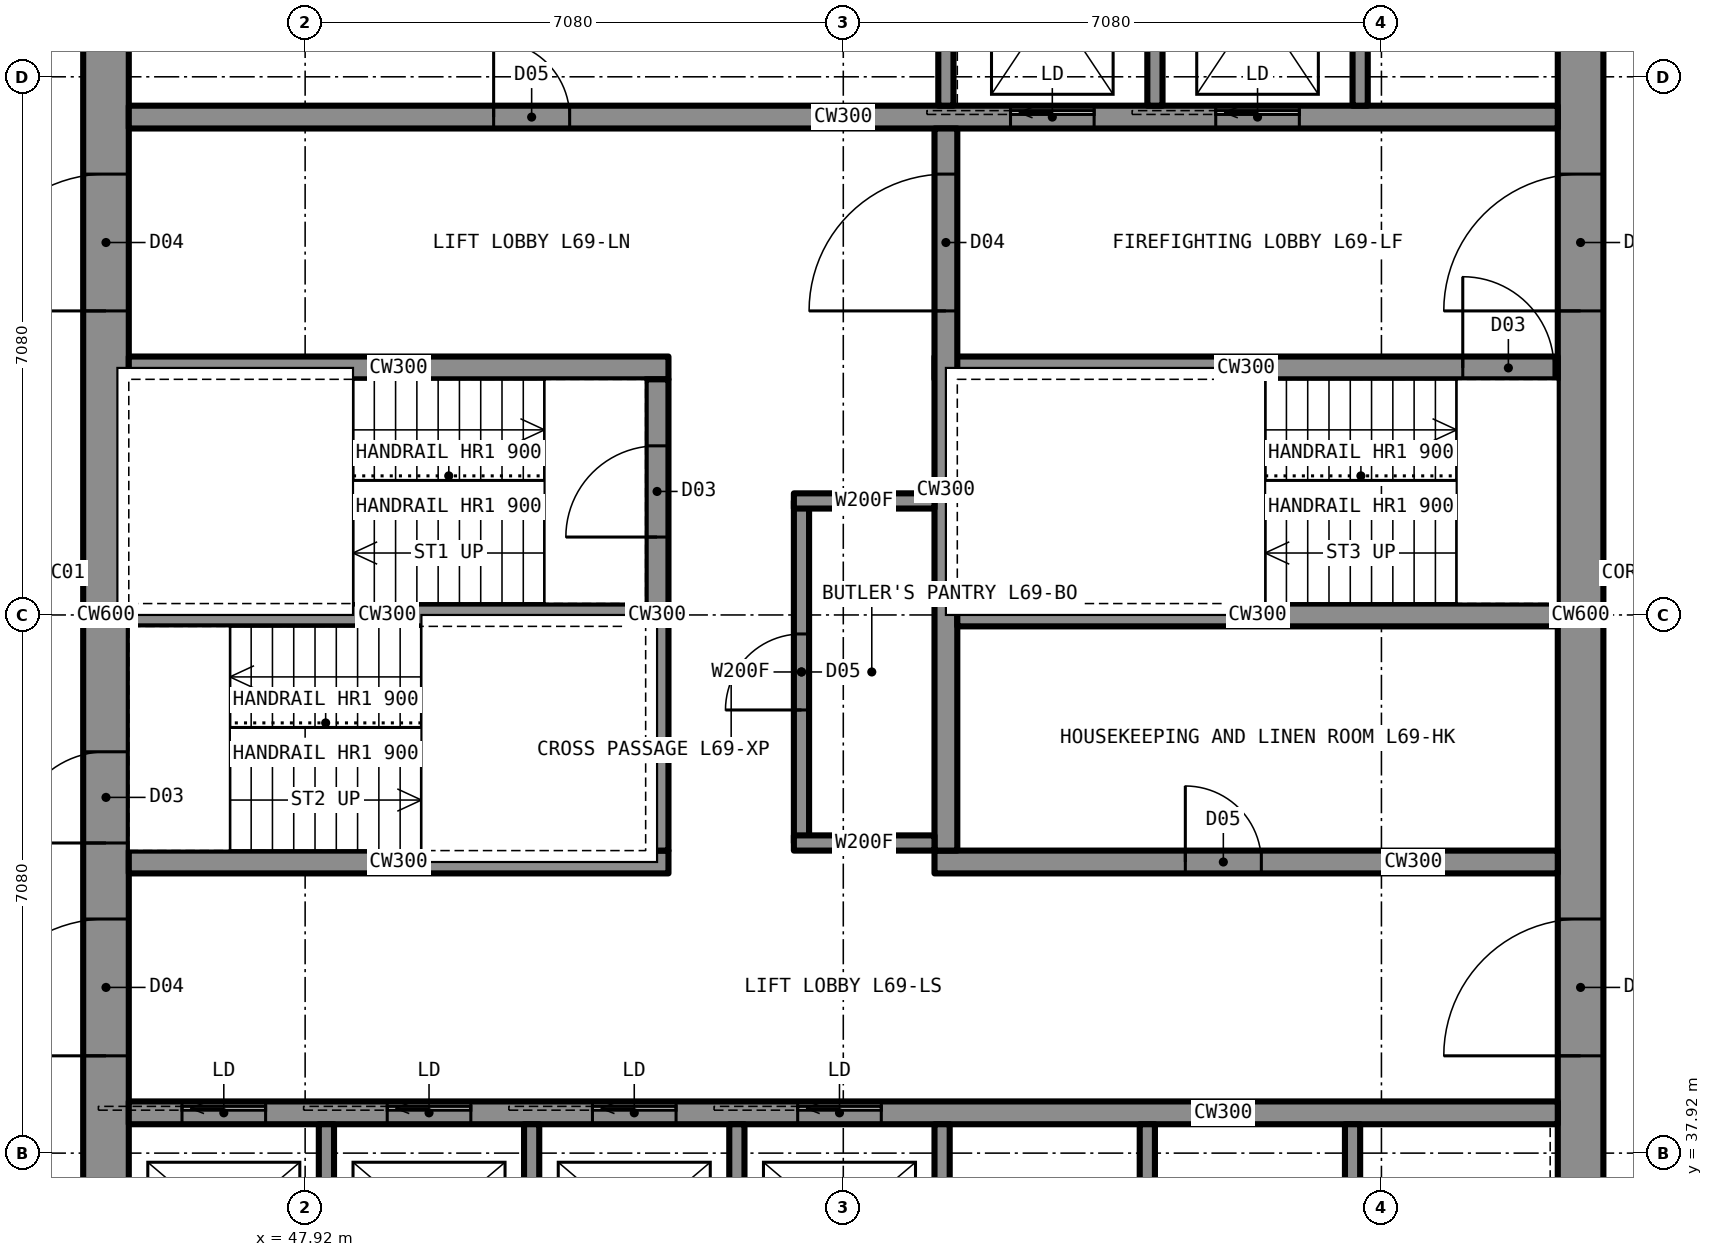
"""IFC4 building model, lengths in metres.
Left out: names, types, materials, properties, quantities, classifications, styles, units other than length and angle.
Written with IfcOpenShell. Run it as: python <this file> out.ifc"""

import sys

from ifc_helpers import new_model, si_unit, direction, frame, frame_2d, origin, place, context, subcontext, project, spatial, rectangle, extrude, element, fill, save


model = new_model("IFC4")
c1 = context("Model", 3, precision=1e-05, world=origin(), true_north=direction((0.0, 1.0)))
c2 = subcontext(c1, "Body", "Model", "MODEL_VIEW")
j1 = project(units=[si_unit("LENGTHUNIT", "METRE"), si_unit("PLANEANGLEUNIT", "RADIAN")], contexts=[c1])
p1 = place(None, origin())
s1 = spatial("IfcSite", under=j1, at=p1, CompositionType="ELEMENT")
p2 = place(p1, origin())
s2 = spatial("IfcBuilding", under=s1, at=p2, CompositionType="ELEMENT")
p3 = place(p2, frame((0.0, 0.0, 254.7)))
s3 = spatial("IfcBuildingStorey", under=s2, at=p3, CompositionType="ELEMENT", Elevation=254.7)
p4 = place(p3, frame((64.7, 35.6, 0.0), z_axis=(0.0, 0.0, 1.0), x_axis=(0.0, 1.0, 0.0)))
e1 = element("IfcWall", 1, at=p4, inside=s3, PredefinedType="SHEAR", context=c2, shape_type="SweptSolid", body=[
    extrude(rectangle(XDim=18.8, YDim=0.6, at=frame_2d((9.4, 0.0))), origin(), (0.0, 0.0, 1.0), 3.5),
])
p5 = place(p4, frame((13.4, 0.0, 0.0)))
e2 = element("IfcOpeningElement", 2, at=p5, cuts=e1, PredefinedType="OPENING", context=c2, shape_type="SweptSolid", body=[
    extrude(rectangle(XDim=1.8, YDim=2.2, at=frame_2d((0.9, 1.1))), frame((0.0, 0.31, 0.0), z_axis=(0.0, -1.0, 0.0), x_axis=(1.0, 0.0, 0.0)), (0.0, 0.0, 1.0), 0.62),
])
p6 = place(p4, frame((3.6, 0.0, 0.0)))
e3 = element("IfcOpeningElement", 3, at=p6, cuts=e1, PredefinedType="OPENING", context=c2, shape_type="SweptSolid", body=[
    extrude(rectangle(XDim=1.8, YDim=2.2, at=frame_2d((0.9, 1.1))), frame((0.0, 0.31, 0.0), z_axis=(0.0, -1.0, 0.0), x_axis=(1.0, 0.0, 0.0)), (0.0, 0.0, 1.0), 0.62),
])
p7 = place(p3, frame((45.3, 35.6, 0.0), z_axis=(0.0, 0.0, 1.0), x_axis=(0.0, 1.0, 0.0)))
e4 = element("IfcWall", 4, at=p7, inside=s3, PredefinedType="SHEAR", context=c2, shape_type="SweptSolid", body=[
    extrude(rectangle(XDim=18.8, YDim=0.6, at=frame_2d((9.4, 0.0))), origin(), (0.0, 0.0, 1.0), 3.5),
])
p8 = place(p7, frame((13.4, 0.0, 0.0)))
e5 = element("IfcOpeningElement", 5, at=p8, cuts=e4, PredefinedType="OPENING", context=c2, shape_type="SweptSolid", body=[
    extrude(rectangle(XDim=1.8, YDim=2.2, at=frame_2d((0.9, 1.1))), frame((0.0, 0.31, 0.0), z_axis=(0.0, -1.0, 0.0), x_axis=(1.0, 0.0, 0.0)), (0.0, 0.0, 1.0), 0.62),
])
p9 = place(p7, frame((3.6, 0.0, 0.0)))
e6 = element("IfcOpeningElement", 6, at=p9, cuts=e4, PredefinedType="OPENING", context=c2, shape_type="SweptSolid", body=[
    extrude(rectangle(XDim=1.8, YDim=2.2, at=frame_2d((0.9, 1.1))), frame((0.0, 0.31, 0.0), z_axis=(0.0, -1.0, 0.0), x_axis=(1.0, 0.0, 0.0)), (0.0, 0.0, 1.0), 0.62),
])
p10 = place(p7, frame((6.4, 0.0, 0.0)))
e7 = element("IfcOpeningElement", 7, at=p10, cuts=e4, PredefinedType="OPENING", context=c2, shape_type="SweptSolid", body=[
    extrude(rectangle(XDim=1.2, YDim=2.2, at=frame_2d((0.6, 1.1))), frame((0.0, 0.31, 0.0), z_axis=(0.0, -1.0, 0.0), x_axis=(1.0, 0.0, 0.0)), (0.0, 0.0, 1.0), 0.62),
])
p11 = place(p3, frame((45.6, 51.55, 0.0), z_axis=(0.0, 0.0, 1.0), x_axis=(1.0, 0.0, 0.0)))
e8 = element("IfcWall", 8, at=p11, inside=s3, PredefinedType="SHEAR", context=c2, shape_type="SweptSolid", body=[
    extrude(rectangle(XDim=18.8, YDim=0.3, at=frame_2d((9.4, 0.0))), origin(), (0.0, 0.0, 1.0), 3.5),
])
p12 = place(p11, frame((4.8, 0.0, 0.0)))
e9 = element("IfcOpeningElement", 9, at=p12, cuts=e8, PredefinedType="OPENING", context=c2, shape_type="SweptSolid", body=[
    extrude(rectangle(XDim=1.0, YDim=2.1, at=frame_2d((0.5, 1.05))), frame((0.0, 0.16, 0.0), z_axis=(0.0, -1.0, 0.0), x_axis=(1.0, 0.0, 0.0)), (0.0, 0.0, 1.0), 0.32),
])
p13 = place(p11, frame((11.6, 0.0, 0.0)))
e10 = element("IfcOpeningElement", 10, at=p13, cuts=e8, PredefinedType="OPENING", context=c2, shape_type="SweptSolid", body=[
    extrude(rectangle(XDim=1.1, YDim=2.2, at=frame_2d((0.55, 1.1))), frame((0.0, 0.16, 0.0), z_axis=(0.0, -1.0, 0.0), x_axis=(1.0, 0.0, 0.0)), (0.0, 0.0, 1.0), 0.32),
])
p14 = place(p11, frame((14.3, 0.0, 0.0)))
e11 = element("IfcOpeningElement", 11, at=p14, cuts=e8, PredefinedType="OPENING", context=c2, shape_type="SweptSolid", body=[
    extrude(rectangle(XDim=1.1, YDim=2.2, at=frame_2d((0.55, 1.1))), frame((0.0, 0.16, 0.0), z_axis=(0.0, -1.0, 0.0), x_axis=(1.0, 0.0, 0.0)), (0.0, 0.0, 1.0), 0.32),
])
p15 = place(p3, frame((45.6, 38.45, 0.0), z_axis=(0.0, 0.0, 1.0), x_axis=(1.0, 0.0, 0.0)))
e12 = element("IfcWall", 12, at=p15, inside=s3, PredefinedType="SHEAR", context=c2, shape_type="SweptSolid", body=[
    extrude(rectangle(XDim=18.8, YDim=0.3, at=frame_2d((9.4, 0.0))), origin(), (0.0, 0.0, 1.0), 3.5),
])
p16 = place(p15, frame((0.7, 0.0, 0.0)))
e13 = element("IfcOpeningElement", 13, at=p16, cuts=e12, PredefinedType="OPENING", context=c2, shape_type="SweptSolid", body=[
    extrude(rectangle(XDim=1.1, YDim=2.2, at=frame_2d((0.55, 1.1))), frame((0.0, 0.16, 0.0), z_axis=(0.0, -1.0, 0.0), x_axis=(1.0, 0.0, 0.0)), (0.0, 0.0, 1.0), 0.32),
])
p17 = place(p15, frame((3.4, 0.0, 0.0)))
e14 = element("IfcOpeningElement", 14, at=p17, cuts=e12, PredefinedType="OPENING", context=c2, shape_type="SweptSolid", body=[
    extrude(rectangle(XDim=1.1, YDim=2.2, at=frame_2d((0.55, 1.1))), frame((0.0, 0.16, 0.0), z_axis=(0.0, -1.0, 0.0), x_axis=(1.0, 0.0, 0.0)), (0.0, 0.0, 1.0), 0.32),
])
p18 = place(p15, frame((6.1, 0.0, 0.0)))
e15 = element("IfcOpeningElement", 15, at=p18, cuts=e12, PredefinedType="OPENING", context=c2, shape_type="SweptSolid", body=[
    extrude(rectangle(XDim=1.1, YDim=2.2, at=frame_2d((0.55, 1.1))), frame((0.0, 0.16, 0.0), z_axis=(0.0, -1.0, 0.0), x_axis=(1.0, 0.0, 0.0)), (0.0, 0.0, 1.0), 0.32),
])
p19 = place(p15, frame((8.8, 0.0, 0.0)))
e16 = element("IfcOpeningElement", 16, at=p19, cuts=e12, PredefinedType="OPENING", context=c2, shape_type="SweptSolid", body=[
    extrude(rectangle(XDim=1.1, YDim=2.2, at=frame_2d((0.55, 1.1))), frame((0.0, 0.16, 0.0), z_axis=(0.0, -1.0, 0.0), x_axis=(1.0, 0.0, 0.0)), (0.0, 0.0, 1.0), 0.32),
])
p20 = place(p3, frame((45.6, 48.25, 0.0), z_axis=(0.0, 0.0, 1.0), x_axis=(1.0, 0.0, 0.0)))
e17 = element("IfcWall", 17, at=p20, inside=s3, PredefinedType="SHEAR", context=c2, shape_type="SweptSolid", body=[
    extrude(rectangle(XDim=7.1, YDim=0.3, at=frame_2d((3.55, 0.0))), origin(), (0.0, 0.0, 1.0), 3.5),
])
p21 = place(p3, frame((56.2, 48.25, 0.0), z_axis=(0.0, 0.0, 1.0), x_axis=(1.0, 0.0, 0.0)))
e18 = element("IfcWall", 18, at=p21, inside=s3, PredefinedType="SHEAR", context=c2, shape_type="SweptSolid", body=[
    extrude(rectangle(XDim=8.2, YDim=0.3, at=frame_2d((4.1, 0.0))), origin(), (0.0, 0.0, 1.0), 3.5),
])
p22 = place(p21, frame((6.95, 0.0, 0.0)))
e19 = element("IfcOpeningElement", 19, at=p22, cuts=e18, PredefinedType="OPENING", context=c2, shape_type="SweptSolid", body=[
    extrude(rectangle(XDim=1.2, YDim=2.2, at=frame_2d((0.6, 1.1))), frame((0.0, 0.16, 0.0), z_axis=(0.0, -1.0, 0.0), x_axis=(1.0, 0.0, 0.0)), (0.0, 0.0, 1.0), 0.32),
])
p23 = place(p3, frame((45.6, 41.75, 0.0), z_axis=(0.0, 0.0, 1.0), x_axis=(1.0, 0.0, 0.0)))
e20 = element("IfcWall", 20, at=p23, inside=s3, PredefinedType="SHEAR", context=c2, shape_type="SweptSolid", body=[
    extrude(rectangle(XDim=7.1, YDim=0.3, at=frame_2d((3.55, 0.0))), origin(), (0.0, 0.0, 1.0), 3.5),
])
p24 = place(p3, frame((56.2, 41.75, 0.0), z_axis=(0.0, 0.0, 1.0), x_axis=(1.0, 0.0, 0.0)))
e21 = element("IfcWall", 21, at=p24, inside=s3, PredefinedType="SHEAR", context=c2, shape_type="SweptSolid", body=[
    extrude(rectangle(XDim=8.2, YDim=0.3, at=frame_2d((4.1, 0.0))), origin(), (0.0, 0.0, 1.0), 3.5),
])
p25 = place(p24, frame((3.3, 0.0, 0.0)))
e22 = element("IfcOpeningElement", 22, at=p25, cuts=e21, PredefinedType="OPENING", context=c2, shape_type="SweptSolid", body=[
    extrude(rectangle(XDim=1.0, YDim=2.1, at=frame_2d((0.5, 1.05))), frame((0.0, 0.16, 0.0), z_axis=(0.0, -1.0, 0.0), x_axis=(1.0, 0.0, 0.0)), (0.0, 0.0, 1.0), 0.32),
])
p26 = place(p3, frame((52.55, 41.9, 0.0), z_axis=(0.0, 0.0, 1.0), x_axis=(0.0, 1.0, 0.0)))
e23 = element("IfcWall", 23, at=p26, inside=s3, PredefinedType="SHEAR", context=c2, shape_type="SweptSolid", body=[
    extrude(rectangle(XDim=6.2, YDim=0.3, at=frame_2d((3.1, 0.0))), origin(), (0.0, 0.0, 1.0), 3.5),
])
p27 = place(p26, frame((4.125, 0.0, 0.0)))
e24 = element("IfcOpeningElement", 24, at=p27, cuts=e23, PredefinedType="OPENING", context=c2, shape_type="SweptSolid", body=[
    extrude(rectangle(XDim=1.2, YDim=2.2, at=frame_2d((0.6, 1.1))), frame((0.0, 0.16, 0.0), z_axis=(0.0, -1.0, 0.0), x_axis=(1.0, 0.0, 0.0)), (0.0, 0.0, 1.0), 0.32),
])
p28 = place(p3, frame((56.35, 41.9, 0.0), z_axis=(0.0, 0.0, 1.0), x_axis=(0.0, 1.0, 0.0)))
e25 = element("IfcWall", 25, at=p28, inside=s3, PredefinedType="SHEAR", context=c2, shape_type="SweptSolid", body=[
    extrude(rectangle(XDim=9.5, YDim=0.3, at=frame_2d((4.75, 0.0))), origin(), (0.0, 0.0, 1.0), 3.5),
])
p29 = place(p28, frame((7.1, 0.0, 0.0)))
e26 = element("IfcOpeningElement", 26, at=p29, cuts=e25, PredefinedType="OPENING", context=c2, shape_type="SweptSolid", body=[
    extrude(rectangle(XDim=1.8, YDim=2.2, at=frame_2d((0.9, 1.1))), frame((0.0, 0.16, 0.0), z_axis=(0.0, -1.0, 0.0), x_axis=(1.0, 0.0, 0.0)), (0.0, 0.0, 1.0), 0.32),
])
p30 = place(p3, frame((45.6, 45.0, 0.0), z_axis=(0.0, 0.0, 1.0), x_axis=(1.0, 0.0, 0.0)))
e27 = element("IfcWall", 27, at=p30, inside=s3, PredefinedType="SHEAR", context=c2, shape_type="SweptSolid", body=[
    extrude(rectangle(XDim=6.8, YDim=0.3, at=frame_2d((3.4, 0.0))), origin(), (0.0, 0.0, 1.0), 3.5),
])
p31 = place(p3, frame((56.5, 45.0, 0.0), z_axis=(0.0, 0.0, 1.0), x_axis=(1.0, 0.0, 0.0)))
e28 = element("IfcWall", 28, at=p31, inside=s3, PredefinedType="SHEAR", context=c2, shape_type="SweptSolid", body=[
    extrude(rectangle(XDim=7.9, YDim=0.3, at=frame_2d((3.95, 0.0))), origin(), (0.0, 0.0, 1.0), 3.5),
])
p32 = place(p3, frame((54.45, 42.0, 0.0), z_axis=(0.0, 0.0, 1.0), x_axis=(0.0, 1.0, 0.0)))
e29 = element("IfcWall", 29, at=p32, inside=s3, PredefinedType="PARTITIONING", context=c2, shape_type="SweptSolid", body=[
    extrude(rectangle(XDim=4.5, YDim=0.2, at=frame_2d((2.25, 0.0))), origin(), (0.0, 0.0, 1.0), 3.33),
])
p33 = place(p32, frame((1.75, 0.0, 0.0)))
e30 = element("IfcOpeningElement", 30, at=p33, cuts=e29, PredefinedType="OPENING", context=c2, shape_type="SweptSolid", body=[
    extrude(rectangle(XDim=1.0, YDim=2.1, at=frame_2d((0.5, 1.05))), frame((0.0, 0.11, 0.0), z_axis=(0.0, -1.0, 0.0), x_axis=(1.0, 0.0, 0.0)), (0.0, 0.0, 1.0), 0.22),
])
for number, where, z_axis, x_axis in (
    (31, (54.35, 42.0, 0.0), (0.0, 0.0, 1.0), (1.0, 0.0, 0.0)),
    (32, (54.35, 46.5, 0.0), (0.0, 0.0, 1.0), (1.0, 0.0, 0.0)),
):
    element("IfcWall", number, at=place(p3, frame(where, z_axis=z_axis, x_axis=x_axis)), inside=s3, PredefinedType="PARTITIONING", context=c2, shape_type="SweptSolid", body=[
        extrude(rectangle(XDim=1.85, YDim=0.2, at=frame_2d((0.925, 0.0))), origin(), (0.0, 0.0, 1.0), 3.33),
    ])
for number, where, z_axis, x_axis in (
    (33, (59.1, 51.7, 0.0), (0.0, 0.0, 1.0), (0.0, 1.0, 0.0)),
    (34, (61.8, 51.7, 0.0), (0.0, 0.0, 1.0), (0.0, 1.0, 0.0)),
    (35, (56.35, 51.7, 0.0), (0.0, 0.0, 1.0), (0.0, 1.0, 0.0)),
    (36, (48.2, 35.6, 0.0), (0.0, 0.0, 1.0), (0.0, 1.0, 0.0)),
    (37, (50.9, 35.6, 0.0), (0.0, 0.0, 1.0), (0.0, 1.0, 0.0)),
    (38, (53.6, 35.6, 0.0), (0.0, 0.0, 1.0), (0.0, 1.0, 0.0)),
    (39, (56.3, 35.6, 0.0), (0.0, 0.0, 1.0), (0.0, 1.0, 0.0)),
    (40, (59.0, 35.6, 0.0), (0.0, 0.0, 1.0), (0.0, 1.0, 0.0)),
    (41, (61.7, 35.6, 0.0), (0.0, 0.0, 1.0), (0.0, 1.0, 0.0)),
):
    element("IfcWall", number, at=place(p3, frame(where, z_axis=z_axis, x_axis=x_axis)), inside=s3, PredefinedType="PARTITIONING", context=c2, shape_type="SweptSolid", body=[
        extrude(rectangle(XDim=2.7, YDim=0.2, at=frame_2d((1.35, 0.0))), origin(), (0.0, 0.0, 1.0), 3.33),
    ])
p34 = place(p33, origin())
e42 = element("IfcDoor", 42, at=p34, inside=s3, OperationType="SINGLE_SWING_LEFT", PredefinedType="DOOR", context=c2, shape_type="SweptSolid", body=[
    extrude(rectangle(XDim=1.0, YDim=2.1, at=frame_2d((0.5, 1.05))), frame((0.0, 0.025, 0.0), z_axis=(0.0, -1.0, 0.0), x_axis=(1.0, 0.0, 0.0)), (0.0, 0.0, 1.0), 0.05),
])
fill(e30, e42)
p35 = place(p8, origin())
e43 = element("IfcDoor", 43, at=p35, inside=s3, OperationType="DOUBLE_DOOR_SINGLE_SWING", PredefinedType="DOOR", context=c2, shape_type="SweptSolid", body=[
    extrude(rectangle(XDim=1.8, YDim=2.2, at=frame_2d((0.9, 1.1))), frame((0.0, 0.025, 0.0), z_axis=(0.0, -1.0, 0.0), x_axis=(1.0, 0.0, 0.0)), (0.0, 0.0, 1.0), 0.05),
])
fill(e5, e43)
p36 = place(p9, origin())
e44 = element("IfcDoor", 44, at=p36, inside=s3, OperationType="DOUBLE_DOOR_SINGLE_SWING", PredefinedType="DOOR", context=c2, shape_type="SweptSolid", body=[
    extrude(rectangle(XDim=1.8, YDim=2.2, at=frame_2d((0.9, 1.1))), frame((0.0, 0.025, 0.0), z_axis=(0.0, -1.0, 0.0), x_axis=(1.0, 0.0, 0.0)), (0.0, 0.0, 1.0), 0.05),
])
fill(e6, e44)
p37 = place(p5, origin())
e45 = element("IfcDoor", 45, at=p37, inside=s3, OperationType="DOUBLE_DOOR_SINGLE_SWING", PredefinedType="DOOR", context=c2, shape_type="SweptSolid", body=[
    extrude(rectangle(XDim=1.8, YDim=2.2, at=frame_2d((0.9, 1.1))), frame((0.0, 0.025, 0.0), z_axis=(0.0, -1.0, 0.0), x_axis=(1.0, 0.0, 0.0)), (0.0, 0.0, 1.0), 0.05),
])
fill(e2, e45)
p38 = place(p6, origin())
e46 = element("IfcDoor", 46, at=p38, inside=s3, OperationType="DOUBLE_DOOR_SINGLE_SWING", PredefinedType="DOOR", context=c2, shape_type="SweptSolid", body=[
    extrude(rectangle(XDim=1.8, YDim=2.2, at=frame_2d((0.9, 1.1))), frame((0.0, 0.025, 0.0), z_axis=(0.0, -1.0, 0.0), x_axis=(1.0, 0.0, 0.0)), (0.0, 0.0, 1.0), 0.05),
])
fill(e3, e46)
p39 = place(p29, origin())
e47 = element("IfcDoor", 47, at=p39, inside=s3, OperationType="DOUBLE_DOOR_SINGLE_SWING", PredefinedType="DOOR", context=c2, shape_type="SweptSolid", body=[
    extrude(rectangle(XDim=1.8, YDim=2.2, at=frame_2d((0.9, 1.1))), frame((0.0, 0.025, 0.0), z_axis=(0.0, -1.0, 0.0), x_axis=(1.0, 0.0, 0.0)), (0.0, 0.0, 1.0), 0.05),
])
fill(e26, e47)
p40 = place(p27, origin())
e48 = element("IfcDoor", 48, at=p40, inside=s3, OperationType="SINGLE_SWING_LEFT", PredefinedType="DOOR", context=c2, shape_type="SweptSolid", body=[
    extrude(rectangle(XDim=1.2, YDim=2.2, at=frame_2d((0.6, 1.1))), frame((0.0, 0.025, 0.0), z_axis=(0.0, -1.0, 0.0), x_axis=(1.0, 0.0, 0.0)), (0.0, 0.0, 1.0), 0.05),
])
fill(e24, e48)
p41 = place(p10, origin())
e49 = element("IfcDoor", 49, at=p41, inside=s3, OperationType="SINGLE_SWING_LEFT", PredefinedType="DOOR", context=c2, shape_type="SweptSolid", body=[
    extrude(rectangle(XDim=1.2, YDim=2.2, at=frame_2d((0.6, 1.1))), frame((0.0, 0.025, 0.0), z_axis=(0.0, -1.0, 0.0), x_axis=(1.0, 0.0, 0.0)), (0.0, 0.0, 1.0), 0.05),
])
fill(e7, e49)
p42 = place(p22, origin())
e50 = element("IfcDoor", 50, at=p42, inside=s3, OperationType="SINGLE_SWING_LEFT", PredefinedType="DOOR", context=c2, shape_type="SweptSolid", body=[
    extrude(rectangle(XDim=1.2, YDim=2.2, at=frame_2d((0.6, 1.1))), frame((0.0, 0.025, 0.0), z_axis=(0.0, -1.0, 0.0), x_axis=(1.0, 0.0, 0.0)), (0.0, 0.0, 1.0), 0.05),
])
fill(e19, e50)
p43 = place(p25, origin())
e51 = element("IfcDoor", 51, at=p43, inside=s3, OperationType="SINGLE_SWING_LEFT", PredefinedType="DOOR", context=c2, shape_type="SweptSolid", body=[
    extrude(rectangle(XDim=1.0, YDim=2.1, at=frame_2d((0.5, 1.05))), frame((0.0, 0.025, 0.0), z_axis=(0.0, -1.0, 0.0), x_axis=(1.0, 0.0, 0.0)), (0.0, 0.0, 1.0), 0.05),
])
fill(e22, e51)
p44 = place(p12, origin())
e52 = element("IfcDoor", 52, at=p44, inside=s3, OperationType="SINGLE_SWING_LEFT", PredefinedType="DOOR", context=c2, shape_type="SweptSolid", body=[
    extrude(rectangle(XDim=1.0, YDim=2.1, at=frame_2d((0.5, 1.05))), frame((0.0, 0.025, 0.0), z_axis=(0.0, -1.0, 0.0), x_axis=(1.0, 0.0, 0.0)), (0.0, 0.0, 1.0), 0.05),
])
fill(e9, e52)
p45 = place(p13, origin())
e53 = element("IfcDoor", 53, at=p45, inside=s3, OperationType="SLIDING_TO_LEFT", PredefinedType="DOOR", context=c2, shape_type="SweptSolid", body=[
    extrude(rectangle(XDim=1.1, YDim=2.2, at=frame_2d((0.55, 1.1))), frame((0.0, 0.025, 0.0), z_axis=(0.0, -1.0, 0.0), x_axis=(1.0, 0.0, 0.0)), (0.0, 0.0, 1.0), 0.05),
])
fill(e10, e53)
p46 = place(p14, origin())
e54 = element("IfcDoor", 54, at=p46, inside=s3, OperationType="SLIDING_TO_LEFT", PredefinedType="DOOR", context=c2, shape_type="SweptSolid", body=[
    extrude(rectangle(XDim=1.1, YDim=2.2, at=frame_2d((0.55, 1.1))), frame((0.0, 0.025, 0.0), z_axis=(0.0, -1.0, 0.0), x_axis=(1.0, 0.0, 0.0)), (0.0, 0.0, 1.0), 0.05),
])
fill(e11, e54)
p47 = place(p16, origin())
e55 = element("IfcDoor", 55, at=p47, inside=s3, OperationType="SLIDING_TO_LEFT", PredefinedType="DOOR", context=c2, shape_type="SweptSolid", body=[
    extrude(rectangle(XDim=1.1, YDim=2.2, at=frame_2d((0.55, 1.1))), frame((0.0, 0.025, 0.0), z_axis=(0.0, -1.0, 0.0), x_axis=(1.0, 0.0, 0.0)), (0.0, 0.0, 1.0), 0.05),
])
fill(e13, e55)
p48 = place(p17, origin())
e56 = element("IfcDoor", 56, at=p48, inside=s3, OperationType="SLIDING_TO_LEFT", PredefinedType="DOOR", context=c2, shape_type="SweptSolid", body=[
    extrude(rectangle(XDim=1.1, YDim=2.2, at=frame_2d((0.55, 1.1))), frame((0.0, 0.025, 0.0), z_axis=(0.0, -1.0, 0.0), x_axis=(1.0, 0.0, 0.0)), (0.0, 0.0, 1.0), 0.05),
])
fill(e14, e56)
p49 = place(p18, origin())
e57 = element("IfcDoor", 57, at=p49, inside=s3, OperationType="SLIDING_TO_LEFT", PredefinedType="DOOR", context=c2, shape_type="SweptSolid", body=[
    extrude(rectangle(XDim=1.1, YDim=2.2, at=frame_2d((0.55, 1.1))), frame((0.0, 0.025, 0.0), z_axis=(0.0, -1.0, 0.0), x_axis=(1.0, 0.0, 0.0)), (0.0, 0.0, 1.0), 0.05),
])
fill(e15, e57)
p50 = place(p19, origin())
e58 = element("IfcDoor", 58, at=p50, inside=s3, OperationType="SLIDING_TO_LEFT", PredefinedType="DOOR", context=c2, shape_type="SweptSolid", body=[
    extrude(rectangle(XDim=1.1, YDim=2.2, at=frame_2d((0.55, 1.1))), frame((0.0, 0.025, 0.0), z_axis=(0.0, -1.0, 0.0), x_axis=(1.0, 0.0, 0.0)), (0.0, 0.0, 1.0), 0.05),
])
fill(e16, e58)
save(model, sys.argv[1])
